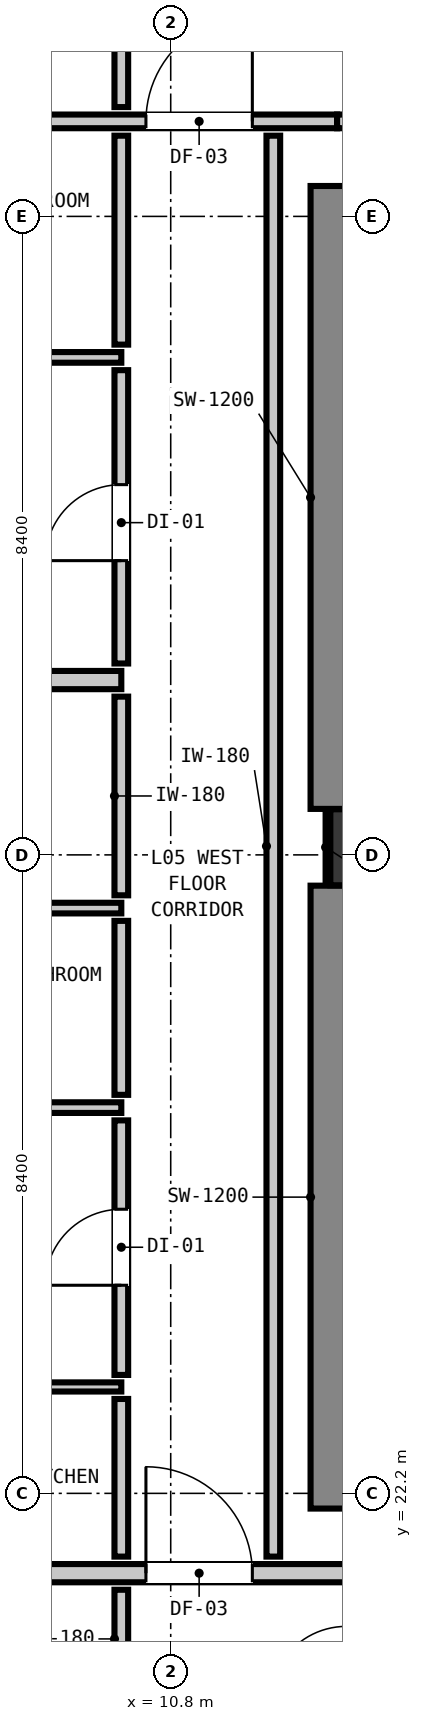
"""IFC4 building model, lengths in metres.
Left out: names, types, materials, properties, quantities, classifications, styles, units other than length and angle.
Written with IfcOpenShell. Run it as: python <this file> out.ifc"""

import sys

from ifc_helpers import new_model, si_unit, direction, frame, frame_2d, origin, origin_2d, place, context, subcontext, project, spatial, rectangle, extrude, element, fill, save


model = new_model("IFC4")
c1 = context("Model", 3, precision=1e-05, world=origin(), true_north=direction((0.0, 1.0)))
c2 = subcontext(c1, "Body", "Model", "MODEL_VIEW")
j1 = project(units=[si_unit("LENGTHUNIT", "METRE"), si_unit("PLANEANGLEUNIT", "RADIAN")], contexts=[c1])
p1 = place(None, origin())
s1 = spatial("IfcSite", under=j1, at=p1, CompositionType="ELEMENT")
p2 = place(p1, origin())
s2 = spatial("IfcBuilding", under=s1, at=p2, CompositionType="ELEMENT")
p3 = place(p2, frame((0.0, 0.0, 22.0)))
s3 = spatial("IfcBuildingStorey", under=s2, at=p3, CompositionType="ELEMENT", Elevation=22.0)
p4 = place(p3, frame((13.4, 30.7, 0.0), z_axis=(0.0, 0.0, 1.0), x_axis=(1.0, 0.0, 0.0)))
e1 = element("IfcColumn", 1, at=p4, inside=s3, PredefinedType="COLUMN", context=c2, shape_type="SweptSolid", body=[
    extrude(rectangle(XDim=1.0, YDim=1.0, at=origin_2d()), origin(), (0.0, 0.0, 1.0), 3.32),
])
p5 = place(p3, frame((13.24, 22.0, 0.0), z_axis=(0.0, 0.0, 1.0), x_axis=(0.0, 1.0, 0.0)))
e2 = element("IfcWall", 2, at=p5, inside=s3, PredefinedType="SHEAR", context=c2, shape_type="SweptSolid", body=[
    extrude(rectangle(XDim=8.195, YDim=1.2, at=frame_2d((4.098, 0.0))), origin(), (0.0, 0.0, 1.0), 3.32),
])
p6 = place(p3, frame((13.24, 31.205, 0.0), z_axis=(0.0, 0.0, 1.0), x_axis=(0.0, 1.0, 0.0)))
e3 = element("IfcWall", 3, at=p6, inside=s3, PredefinedType="SHEAR", context=c2, shape_type="SweptSolid", body=[
    extrude(rectangle(XDim=8.195, YDim=1.2, at=frame_2d((4.097, 0.0))), origin(), (0.0, 0.0, 1.0), 3.32),
])
p7 = place(p3, frame((1.827, 21.15, 0.0), z_axis=(0.0, 0.0, 1.0), x_axis=(1.0, 0.0, 0.0)))
e4 = element("IfcWall", 4, at=p7, inside=s3, PredefinedType="PARTITIONING", context=c2, shape_type="SweptSolid", body=[
    extrude(rectangle(XDim=42.146, YDim=0.24, at=frame_2d((21.073, 0.0))), origin(), (0.0, 0.0, 1.0), 3.06),
])
p8 = place(p7, frame((16.383, 0.0, 0.0)))
e5 = element("IfcOpeningElement", 5, at=p8, cuts=e4, PredefinedType="OPENING", context=c2, shape_type="SweptSolid", body=[
    extrude(rectangle(XDim=1.1, YDim=2.15, at=frame_2d((0.55, 1.075))), frame((0.0, 0.13, 0.0), z_axis=(0.0, -1.0, 0.0), x_axis=(1.0, 0.0, 0.0)), (0.0, 0.0, 1.0), 0.26),
])
p9 = place(p7, frame((8.647, 0.0, 0.0)))
e6 = element("IfcOpeningElement", 6, at=p9, cuts=e4, PredefinedType="OPENING", context=c2, shape_type="SweptSolid", body=[
    extrude(rectangle(XDim=1.4, YDim=2.15, at=frame_2d((0.7, 1.075))), frame((0.0, 0.13, 0.0), z_axis=(0.0, -1.0, 0.0), x_axis=(1.0, 0.0, 0.0)), (0.0, 0.0, 1.0), 0.26),
])
p10 = place(p7, frame((38.524, 0.0, 0.0)))
e7 = element("IfcOpeningElement", 7, at=p10, cuts=e4, PredefinedType="OPENING", context=c2, shape_type="SweptSolid", body=[
    extrude(rectangle(XDim=1.0, YDim=2.15, at=frame_2d((0.5, 1.075))), frame((0.0, 0.13, 0.0), z_axis=(0.0, -1.0, 0.0), x_axis=(1.0, 0.0, 0.0)), (0.0, 0.0, 1.0), 0.26),
])
p11 = place(p3, frame((1.827, 32.9, 0.0), z_axis=(0.0, 0.0, 1.0), x_axis=(1.0, 0.0, 0.0)))
e8 = element("IfcWall", 8, at=p11, inside=s3, PredefinedType="PARTITIONING", context=c2, shape_type="SweptSolid", body=[
    extrude(rectangle(XDim=8.323, YDim=0.24, at=frame_2d((4.162, 0.0))), origin(), (0.0, 0.0, 1.0), 3.06),
])
p12 = place(p11, frame((3.698, 0.0, 0.0)))
e9 = element("IfcOpeningElement", 9, at=p12, cuts=e8, PredefinedType="OPENING", context=c2, shape_type="SweptSolid", body=[
    extrude(rectangle(XDim=0.9, YDim=2.1, at=frame_2d((0.45, 1.05))), frame((0.0, 0.13, 0.0), z_axis=(0.0, -1.0, 0.0), x_axis=(1.0, 0.0, 0.0)), (0.0, 0.0, 1.0), 0.26),
])
p13 = place(p3, frame((2.661, 40.25, 0.0), z_axis=(0.0, 0.0, 1.0), x_axis=(1.0, 0.0, 0.0)))
e10 = element("IfcWall", 10, at=p13, inside=s3, PredefinedType="PARTITIONING", context=c2, shape_type="SweptSolid", body=[
    extrude(rectangle(XDim=10.328, YDim=0.18, at=frame_2d((5.164, 0.0))), origin(), (0.0, 0.0, 1.0), 2.445),
])
p14 = place(p13, frame((7.813, 0.0, 0.0)))
e11 = element("IfcOpeningElement", 11, at=p14, cuts=e10, PredefinedType="OPENING", context=c2, shape_type="SweptSolid", body=[
    extrude(rectangle(XDim=1.4, YDim=2.15, at=frame_2d((0.7, 1.075))), frame((0.0, 0.1, 0.0), z_axis=(0.0, -1.0, 0.0), x_axis=(1.0, 0.0, 0.0)), (0.0, 0.0, 1.0), 0.2),
])
p15 = place(p3, frame((12.989, 40.25, 0.0), z_axis=(0.0, 0.0, 1.0), x_axis=(1.0, 0.0, 0.0)))
e12 = element("IfcWall", 12, at=p15, inside=s3, PredefinedType="PARTITIONING", context=c2, shape_type="SweptSolid", body=[
    extrude(rectangle(XDim=30.984, YDim=0.18, at=frame_2d((15.492, 0.0))), origin(), (0.0, 0.0, 1.0), 3.06),
])
p16 = place(p15, frame((4.446, 0.0, 0.0)))
e13 = element("IfcOpeningElement", 13, at=p16, cuts=e12, PredefinedType="OPENING", context=c2, shape_type="SweptSolid", body=[
    extrude(rectangle(XDim=1.4, YDim=2.15, at=frame_2d((0.7, 1.075))), frame((0.0, 0.1, 0.0), z_axis=(0.0, -1.0, 0.0), x_axis=(1.0, 0.0, 0.0)), (0.0, 0.0, 1.0), 0.2),
])
p17 = place(p15, frame((27.362, 0.0, 0.0)))
e14 = element("IfcOpeningElement", 14, at=p17, cuts=e12, PredefinedType="OPENING", context=c2, shape_type="SweptSolid", body=[
    extrude(rectangle(XDim=1.0, YDim=2.15, at=frame_2d((0.5, 1.075))), frame((0.0, 0.1, 0.0), z_axis=(0.0, -1.0, 0.0), x_axis=(1.0, 0.0, 0.0)), (0.0, 0.0, 1.0), 0.2),
])
p18 = place(p3, frame((1.827, 27.275, 0.0), z_axis=(0.0, 0.0, 1.0), x_axis=(1.0, 0.0, 0.0)))
e15 = element("IfcWall", 15, at=p18, inside=s3, PredefinedType="PARTITIONING", context=c2, shape_type="SweptSolid", body=[
    extrude(rectangle(XDim=8.323, YDim=0.14, at=frame_2d((4.162, 0.0))), origin(), (0.0, 0.0, 1.0), 3.06),
])
p19 = place(p18, frame((6.085, 0.0, 0.0)))
e16 = element("IfcOpeningElement", 16, at=p19, cuts=e15, PredefinedType="OPENING", context=c2, shape_type="SweptSolid", body=[
    extrude(rectangle(XDim=0.86, YDim=2.02, at=frame_2d((0.43, 1.01))), frame((0.0, 0.08, 0.0), z_axis=(0.0, -1.0, 0.0), x_axis=(1.0, 0.0, 0.0)), (0.0, 0.0, 1.0), 0.16),
])
p20 = place(p18, frame((1.915, 0.0, 0.0)))
e17 = element("IfcOpeningElement", 17, at=p20, cuts=e15, PredefinedType="OPENING", context=c2, shape_type="SweptSolid", body=[
    extrude(rectangle(XDim=0.9, YDim=2.1, at=frame_2d((0.45, 1.05))), frame((0.0, 0.08, 0.0), z_axis=(0.0, -1.0, 0.0), x_axis=(1.0, 0.0, 0.0)), (0.0, 0.0, 1.0), 0.16),
])
p21 = place(p3, frame((1.827, 29.9, 0.0), z_axis=(0.0, 0.0, 1.0), x_axis=(1.0, 0.0, 0.0)))
e18 = element("IfcWall", 18, at=p21, inside=s3, PredefinedType="PARTITIONING", context=c2, shape_type="SweptSolid", body=[
    extrude(rectangle(XDim=8.323, YDim=0.14, at=frame_2d((4.162, 0.0))), origin(), (0.0, 0.0, 1.0), 3.06),
])
p22 = place(p3, frame((1.827, 37.145, 0.0), z_axis=(0.0, 0.0, 1.0), x_axis=(1.0, 0.0, 0.0)))
e19 = element("IfcWall", 19, at=p22, inside=s3, PredefinedType="PARTITIONING", context=c2, shape_type="SweptSolid", body=[
    extrude(rectangle(XDim=8.323, YDim=0.14, at=frame_2d((4.162, 0.0))), origin(), (0.0, 0.0, 1.0), 3.06),
])
p23 = place(p22, frame((6.085, 0.0, 0.0)))
e20 = element("IfcOpeningElement", 20, at=p23, cuts=e19, PredefinedType="OPENING", context=c2, shape_type="SweptSolid", body=[
    extrude(rectangle(XDim=0.86, YDim=2.02, at=frame_2d((0.43, 1.01))), frame((0.0, 0.08, 0.0), z_axis=(0.0, -1.0, 0.0), x_axis=(1.0, 0.0, 0.0)), (0.0, 0.0, 1.0), 0.16),
])
p24 = place(p22, frame((1.915, 0.0, 0.0)))
e21 = element("IfcOpeningElement", 21, at=p24, cuts=e19, PredefinedType="OPENING", context=c2, shape_type="SweptSolid", body=[
    extrude(rectangle(XDim=0.9, YDim=2.1, at=frame_2d((0.45, 1.05))), frame((0.0, 0.08, 0.0), z_axis=(0.0, -1.0, 0.0), x_axis=(1.0, 0.0, 0.0)), (0.0, 0.0, 1.0), 0.16),
])
p25 = place(p3, frame((1.827, 23.6, 0.0), z_axis=(0.0, 0.0, 1.0), x_axis=(1.0, 0.0, 0.0)))
e22 = element("IfcWall", 22, at=p25, inside=s3, PredefinedType="PARTITIONING", context=c2, shape_type="SweptSolid", body=[
    extrude(rectangle(XDim=8.323, YDim=0.12, at=frame_2d((4.162, 0.0))), origin(), (0.0, 0.0, 1.0), 3.06),
])
p26 = place(p25, frame((3.698, 0.0, 0.0)))
e23 = element("IfcOpeningElement", 23, at=p26, cuts=e22, PredefinedType="OPENING", context=c2, shape_type="SweptSolid", body=[
    extrude(rectangle(XDim=0.9, YDim=2.1, at=frame_2d((0.45, 1.05))), frame((0.0, 0.07, 0.0), z_axis=(0.0, -1.0, 0.0), x_axis=(1.0, 0.0, 0.0)), (0.0, 0.0, 1.0), 0.14),
])
p27 = place(p3, frame((10.15, 19.638, 0.0), z_axis=(0.0, 0.0, 1.0), x_axis=(0.0, 1.0, 0.0)))
e24 = element("IfcWall", 24, at=p27, inside=s3, PredefinedType="PARTITIONING", context=c2, shape_type="SweptSolid", body=[
    extrude(rectangle(XDim=1.294, YDim=0.18, at=frame_2d((0.647, 0.0))), origin(), (0.0, 0.0, 1.0), 3.06),
])
p28 = place(p3, frame((10.15, 21.368, 0.0), z_axis=(0.0, 0.0, 1.0), x_axis=(0.0, 1.0, 0.0)))
e25 = element("IfcWall", 25, at=p28, inside=s3, PredefinedType="PARTITIONING", context=c2, shape_type="SweptSolid", body=[
    extrude(rectangle(XDim=2.074, YDim=0.18, at=frame_2d((1.037, 0.0))), origin(), (0.0, 0.0, 1.0), 3.06),
])
p29 = place(p3, frame((10.15, 23.758, 0.0), z_axis=(0.0, 0.0, 1.0), x_axis=(0.0, 1.0, 0.0)))
e26 = element("IfcWall", 26, at=p29, inside=s3, PredefinedType="PARTITIONING", context=c2, shape_type="SweptSolid", body=[
    extrude(rectangle(XDim=3.349, YDim=0.18, at=frame_2d((1.674, 0.0))), origin(), (0.0, 0.0, 1.0), 3.06),
])
p30 = place(p29, frame((1.18, 0.0, 0.0)))
e27 = element("IfcOpeningElement", 27, at=p30, cuts=e26, PredefinedType="OPENING", context=c2, shape_type="SweptSolid", body=[
    extrude(rectangle(XDim=1.0, YDim=2.15, at=frame_2d((0.5, 1.075))), frame((0.0, 0.1, 0.0), z_axis=(0.0, -1.0, 0.0), x_axis=(1.0, 0.0, 0.0)), (0.0, 0.0, 1.0), 0.2),
])
p31 = place(p3, frame((10.15, 27.443, 0.0), z_axis=(0.0, 0.0, 1.0), x_axis=(0.0, 1.0, 0.0)))
e28 = element("IfcWall", 28, at=p31, inside=s3, PredefinedType="PARTITIONING", context=c2, shape_type="SweptSolid", body=[
    extrude(rectangle(XDim=2.289, YDim=0.18, at=frame_2d((1.145, 0.0))), origin(), (0.0, 0.0, 1.0), 3.06),
])
p32 = place(p3, frame((10.15, 30.068, 0.0), z_axis=(0.0, 0.0, 1.0), x_axis=(0.0, 1.0, 0.0)))
e29 = element("IfcWall", 29, at=p32, inside=s3, PredefinedType="PARTITIONING", context=c2, shape_type="SweptSolid", body=[
    extrude(rectangle(XDim=2.614, YDim=0.18, at=frame_2d((1.307, 0.0))), origin(), (0.0, 0.0, 1.0), 3.06),
])
p33 = place(p3, frame((10.15, 33.118, 0.0), z_axis=(0.0, 0.0, 1.0), x_axis=(0.0, 1.0, 0.0)))
e30 = element("IfcWall", 30, at=p33, inside=s3, PredefinedType="PARTITIONING", context=c2, shape_type="SweptSolid", body=[
    extrude(rectangle(XDim=3.859, YDim=0.18, at=frame_2d((1.93, 0.0))), origin(), (0.0, 0.0, 1.0), 3.06),
])
p34 = place(p33, frame((1.353, 0.0, 0.0)))
e31 = element("IfcOpeningElement", 31, at=p34, cuts=e30, PredefinedType="OPENING", context=c2, shape_type="SweptSolid", body=[
    extrude(rectangle(XDim=1.0, YDim=2.15, at=frame_2d((0.5, 1.075))), frame((0.0, 0.1, 0.0), z_axis=(0.0, -1.0, 0.0), x_axis=(1.0, 0.0, 0.0)), (0.0, 0.0, 1.0), 0.2),
])
p35 = place(p3, frame((10.15, 37.313, 0.0), z_axis=(0.0, 0.0, 1.0), x_axis=(0.0, 1.0, 0.0)))
e32 = element("IfcWall", 32, at=p35, inside=s3, PredefinedType="PARTITIONING", context=c2, shape_type="SweptSolid", body=[
    extrude(rectangle(XDim=2.749, YDim=0.18, at=frame_2d((1.375, 0.0))), origin(), (0.0, 0.0, 1.0), 3.06),
])
p36 = place(p3, frame((10.15, 40.438, 0.0), z_axis=(0.0, 0.0, 1.0), x_axis=(0.0, 1.0, 0.0)))
e33 = element("IfcWall", 33, at=p36, inside=s3, PredefinedType="PARTITIONING", context=c2, shape_type="SweptSolid", body=[
    extrude(rectangle(XDim=1.324, YDim=0.18, at=frame_2d((0.662, 0.0))), origin(), (0.0, 0.0, 1.0), 3.06),
])
p37 = place(p3, frame((12.15, 21.368, 0.0), z_axis=(0.0, 0.0, 1.0), x_axis=(0.0, 1.0, 0.0)))
e34 = element("IfcWall", 34, at=p37, inside=s3, PredefinedType="PARTITIONING", context=c2, shape_type="SweptSolid", body=[
    extrude(rectangle(XDim=18.694, YDim=0.18, at=frame_2d((9.347, 0.0))), origin(), (0.0, 0.0, 1.0), 3.06),
])
p38 = place(p3, frame((12.868, 30.21, 0.0), z_axis=(0.0, 0.0, 1.0), x_axis=(0.0, 1.0, 0.0)))
e35 = element("IfcWall", 35, at=p38, inside=s3, PredefinedType="PARTITIONING", context=c2, shape_type="SweptSolid", body=[
    extrude(rectangle(XDim=0.98, YDim=0.06, at=frame_2d((0.49, 0.0))), origin(), (0.0, 0.0, 1.0), 1.45),
])
p39 = place(p9, origin())
e36 = element("IfcDoor", 36, at=p39, inside=s3, OperationType="SINGLE_SWING_LEFT", PredefinedType="DOOR", context=c2, shape_type="SweptSolid", body=[
    extrude(rectangle(XDim=1.4, YDim=2.15, at=frame_2d((0.7, 1.075))), frame((0.0, 0.025, 0.0), z_axis=(0.0, -1.0, 0.0), x_axis=(1.0, 0.0, 0.0)), (0.0, 0.0, 1.0), 0.05),
])
fill(e6, e36)
p40 = place(p14, origin())
e37 = element("IfcDoor", 37, at=p40, inside=s3, OperationType="SINGLE_SWING_RIGHT", PredefinedType="DOOR", context=c2, shape_type="SweptSolid", body=[
    extrude(rectangle(XDim=1.4, YDim=2.15, at=frame_2d((0.7, 1.075))), frame((0.0, 0.025, 0.0), z_axis=(0.0, -1.0, 0.0), x_axis=(1.0, 0.0, 0.0)), (0.0, 0.0, 1.0), 0.05),
])
fill(e11, e37)
p41 = place(p30, origin())
e38 = element("IfcDoor", 38, at=p41, inside=s3, OperationType="SINGLE_SWING_LEFT", PredefinedType="DOOR", context=c2, shape_type="SweptSolid", body=[
    extrude(rectangle(XDim=1.0, YDim=2.15, at=frame_2d((0.5, 1.075))), frame((0.0, 0.025, 0.0), z_axis=(0.0, -1.0, 0.0), x_axis=(1.0, 0.0, 0.0)), (0.0, 0.0, 1.0), 0.05),
])
fill(e27, e38)
p42 = place(p34, origin())
e39 = element("IfcDoor", 39, at=p42, inside=s3, OperationType="SINGLE_SWING_LEFT", PredefinedType="DOOR", context=c2, shape_type="SweptSolid", body=[
    extrude(rectangle(XDim=1.0, YDim=2.15, at=frame_2d((0.5, 1.075))), frame((0.0, 0.025, 0.0), z_axis=(0.0, -1.0, 0.0), x_axis=(1.0, 0.0, 0.0)), (0.0, 0.0, 1.0), 0.05),
])
fill(e31, e39)
save(model, sys.argv[1])
